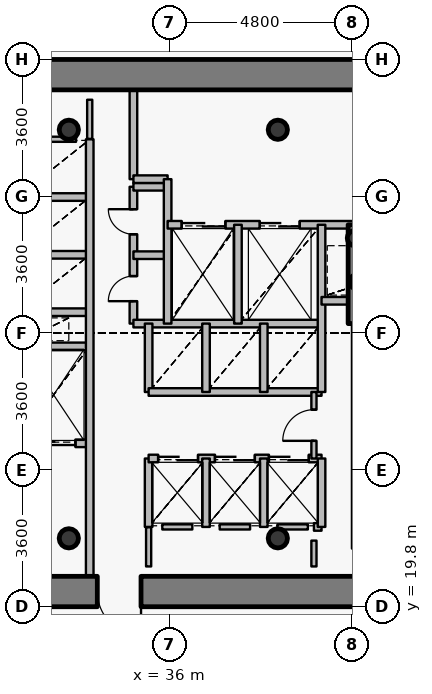
"""IFC4 building model, lengths in metres.
Left out: names, types, materials, properties, quantities, classifications, styles, units other than length and angle.
Written with IfcOpenShell. Run it as: python <this file> out.ifc"""

import sys

from ifc_helpers import new_model, si_unit, direction, frame, frame_2d, origin, origin_2d, place, context, subcontext, project, spatial, rectangle, hollow_circle, extrude, source, transform, mapped, element, fill, save


model = new_model("IFC4")
c1 = context("Model", 3, precision=1e-05, world=origin(), true_north=direction((0.0, 1.0)))
c2 = subcontext(c1, "Body", "Model", "MODEL_VIEW")
j1 = project(units=[si_unit("LENGTHUNIT", "METRE"), si_unit("PLANEANGLEUNIT", "RADIAN")], contexts=[c1])
p1 = place(None, origin())
s1 = spatial("IfcSite", under=j1, at=p1, CompositionType="ELEMENT")
p2 = place(p1, origin())
s2 = spatial("IfcBuilding", under=s1, at=p2, CompositionType="ELEMENT")
p3 = place(p2, frame((0.0, 0.0, 92.4)))
s3 = spatial("IfcBuildingStorey", under=s2, at=p3, CompositionType="ELEMENT", Elevation=92.4)
for number, where, z_axis, x_axis in (
    (1, (33.35, 21.6, 0.0), (0.0, 0.0, 1.0), (1.0, 0.0, 0.0)),
    (2, (38.85, 21.6, 0.0), (0.0, 0.0, 1.0), (1.0, 0.0, 0.0)),
    (3, (38.85, 32.35, 0.0), (0.0, 0.0, 1.0), (1.0, 0.0, 0.0)),
    (4, (33.35, 32.35, 0.0), (0.0, 0.0, 1.0), (1.0, 0.0, 0.0)),
):
    element("IfcColumn", number, at=place(p3, frame(where, z_axis=z_axis, x_axis=x_axis)), inside=s3, PredefinedType="COLUMN", context=c2, shape_type="SweptSolid", body=[
        extrude(hollow_circle(Radius=0.254, WallThickness=0.02, at=origin_2d()), origin(), (0.0, 0.0, 1.0), 4.8),
    ])
for number, where, z_axis, x_axis in (
    (5, (40.95, 28.35, 0.0), (0.0, 0.0, 1.0), (1.0, 0.0, 0.0)),
    (6, (40.88, 29.5, 0.0), (0.0, 0.0, 1.0), (1.0, 0.0, 0.0)),
):
    element("IfcColumn", number, at=place(p3, frame(where, z_axis=z_axis, x_axis=x_axis)), inside=s3, PredefinedType="COLUMN", context=c2, shape_type="SweptSolid", body=[
        extrude(hollow_circle(Radius=0.203, WallThickness=0.016, at=origin_2d()), origin(), (0.0, 0.0, 1.0), 4.8),
    ])
p4 = place(p3, frame((26.6, 33.8, 0.0), z_axis=(0.0, 0.0, 1.0), x_axis=(1.0, 0.0, 0.0)))
e7 = element("IfcWall", 7, at=p4, inside=s3, PredefinedType="SHEAR", context=c2, shape_type="SweptSolid", body=[
    extrude(rectangle(XDim=18.8, YDim=0.8, at=frame_2d((9.4, 0.0))), origin(), (0.0, 0.0, 1.0), 4.0),
])
p5 = place(p3, frame((45.4, 20.2, 0.0), z_axis=(0.0, 0.0, 1.0), x_axis=(-1.0, 0.0, 0.0)))
e8 = element("IfcWall", 8, at=p5, inside=s3, PredefinedType="SHEAR", context=c2, shape_type="SweptSolid", body=[
    extrude(rectangle(XDim=18.8, YDim=0.8, at=frame_2d((9.4, 0.0))), origin(), (0.0, 0.0, 1.0), 4.0),
])
p6 = place(p5, frame((10.15, 0.0, 0.0)))
e9 = element("IfcOpeningElement", 9, at=p6, cuts=e8, PredefinedType="OPENING", context=c2, shape_type="SweptSolid", body=[
    extrude(rectangle(XDim=1.15, YDim=2.15, at=origin_2d()), frame((0.575, 0.41, 1.075), z_axis=(0.0, -1.0, 0.0), x_axis=(1.0, 0.0, 0.0)), (0.0, 0.0, 1.0), 0.82),
])
p7 = place(p3, frame((40.9, 27.25, 0.0), z_axis=(0.0, 0.0, 1.0), x_axis=(0.0, 1.0, 0.0)))
e10 = element("IfcWall", 10, at=p7, inside=s3, PredefinedType="SHEAR", context=c2, shape_type="SweptSolid", body=[
    extrude(rectangle(XDim=2.6, YDim=0.4, at=frame_2d((1.3, 0.0))), origin(), (0.0, 0.0, 1.0), 4.15),
])
p8 = place(p3, frame((32.0, 24.1, 0.0), z_axis=(0.0, 0.0, 1.0), x_axis=(1.0, 0.0, 0.0)))
e11 = element("IfcWall", 11, at=p8, inside=s3, PredefinedType="PARTITIONING", context=c2, shape_type="SweptSolid", body=[
    extrude(rectangle(XDim=1.9, YDim=0.2, at=frame_2d((0.95, 0.0))), origin(), (0.0, 0.0, 1.0), 4.135),
])
p9 = place(p8, frame((0.375, 0.0, 0.0)))
e12 = element("IfcOpeningElement", 12, at=p9, cuts=e11, PredefinedType="OPENING", context=c2, shape_type="SweptSolid", body=[
    extrude(rectangle(XDim=1.15, YDim=2.15, at=origin_2d()), frame((0.575, 0.11, 1.075), z_axis=(0.0, -1.0, 0.0), x_axis=(1.0, 0.0, 0.0)), (0.0, 0.0, 1.0), 0.22),
])
for number, where, z_axis, x_axis in (
    (13, (32.0, 26.65, 0.0), (0.0, 0.0, 1.0), (1.0, 0.0, 0.0)),
    (14, (32.0, 27.55, 0.0), (0.0, 0.0, 1.0), (1.0, 0.0, 0.0)),
    (15, (32.0, 29.06, 0.0), (0.0, 0.0, 1.0), (1.0, 0.0, 0.0)),
    (16, (32.0, 30.58, 0.0), (0.0, 0.0, 1.0), (1.0, 0.0, 0.0)),
):
    element("IfcWall", number, at=place(p3, frame(where, z_axis=z_axis, x_axis=x_axis)), inside=s3, PredefinedType="PARTITIONING", context=c2, shape_type="SweptSolid", body=[
        extrude(rectangle(XDim=1.9, YDim=0.2, at=frame_2d((0.95, 0.0))), origin(), (0.0, 0.0, 1.0), 4.135),
    ])
p10 = place(p3, frame((33.9, 20.6, 0.0), z_axis=(0.0, 0.0, 1.0), x_axis=(0.0, 1.0, 0.0)))
e17 = element("IfcWall", 17, at=p10, inside=s3, PredefinedType="PARTITIONING", context=c2, shape_type="SweptSolid", body=[
    extrude(rectangle(XDim=11.5, YDim=0.2, at=frame_2d((5.75, 0.0))), origin(), (0.0, 0.0, 1.0), 4.135),
])
p11 = place(p3, frame((35.05, 27.25, 0.0), z_axis=(0.0, 0.0, 1.0), x_axis=(0.0, 1.0, 0.0)))
e18 = element("IfcWall", 18, at=p11, inside=s3, PredefinedType="PARTITIONING", context=c2, shape_type="SweptSolid", body=[
    extrude(rectangle(XDim=3.6, YDim=0.2, at=frame_2d((1.8, 0.0))), origin(), (0.0, 0.0, 1.0), 4.55),
])
p12 = place(p11, frame((0.59, 0.0, 0.0)))
e19 = element("IfcOpeningElement", 19, at=p12, cuts=e18, PredefinedType="OPENING", context=c2, shape_type="SweptSolid", body=[
    extrude(rectangle(XDim=0.66, YDim=2.05, at=origin_2d()), frame((0.33, 0.11, 1.025), z_axis=(0.0, -1.0, 0.0), x_axis=(1.0, 0.0, 0.0)), (0.0, 0.0, 1.0), 0.22),
])
p13 = place(p11, frame((2.35, 0.0, 0.0)))
e20 = element("IfcOpeningElement", 20, at=p13, cuts=e18, PredefinedType="OPENING", context=c2, shape_type="SweptSolid", body=[
    extrude(rectangle(XDim=0.66, YDim=2.05, at=origin_2d()), frame((0.33, 0.11, 1.025), z_axis=(0.0, -1.0, 0.0), x_axis=(1.0, 0.0, 0.0)), (0.0, 0.0, 1.0), 0.22),
])
p14 = place(p3, frame((35.05, 27.25, 0.0), z_axis=(0.0, 0.0, 1.0), x_axis=(1.0, 0.0, 0.0)))
e21 = element("IfcWall", 21, at=p14, inside=s3, PredefinedType="PARTITIONING", context=c2, shape_type="SweptSolid", body=[
    extrude(rectangle(XDim=4.95, YDim=0.2, at=frame_2d((2.475, 0.0))), origin(), (0.0, 0.0, 1.0), 4.135),
])
for number, where, z_axis, x_axis in (
    (22, (35.05, 29.05, 0.0), (0.0, 0.0, 1.0), (1.0, 0.0, 0.0)),
    (23, (35.05, 30.85, 0.0), (0.0, 0.0, 1.0), (1.0, 0.0, 0.0)),
):
    element("IfcWall", number, at=place(p3, frame(where, z_axis=z_axis, x_axis=x_axis)), inside=s3, PredefinedType="PARTITIONING", context=c2, shape_type="SweptSolid", body=[
        extrude(rectangle(XDim=0.9, YDim=0.2, at=frame_2d((0.45, 0.0))), origin(), (0.0, 0.0, 1.0), 4.55),
    ])
p15 = place(p3, frame((35.05, 31.05, 0.0), z_axis=(0.0, 0.0, 1.0), x_axis=(0.0, 1.0, 0.0)))
e24 = element("IfcWall", 24, at=p15, inside=s3, PredefinedType="PARTITIONING", context=c2, shape_type="SweptSolid", body=[
    extrude(rectangle(XDim=2.35, YDim=0.2, at=frame_2d((1.175, 0.0))), origin(), (0.0, 0.0, 1.0), 4.135),
])
p16 = place(p3, frame((35.05, 31.05, 0.0), z_axis=(0.0, 0.0, 1.0), x_axis=(1.0, 0.0, 0.0)))
e25 = element("IfcWall", 25, at=p16, inside=s3, PredefinedType="PARTITIONING", context=c2, shape_type="SweptSolid", body=[
    extrude(rectangle(XDim=0.9, YDim=0.2, at=frame_2d((0.45, 0.0))), origin(), (0.0, 0.0, 1.0), 4.55),
])
p17 = place(p3, frame((35.45, 21.9, 0.0), z_axis=(0.0, 0.0, 1.0), x_axis=(0.0, 1.0, 0.0)))
e26 = element("IfcWall", 26, at=p17, inside=s3, PredefinedType="PARTITIONING", context=c2, shape_type="SweptSolid", body=[
    extrude(rectangle(XDim=1.8, YDim=0.2, at=frame_2d((0.9, 0.0))), origin(), (0.0, 0.0, 1.0), 4.55),
])
p18 = place(p3, frame((35.45, 23.7, 0.0), z_axis=(0.0, 0.0, 1.0), x_axis=(1.0, 0.0, 0.0)))
e27 = element("IfcWall", 27, at=p18, inside=s3, PredefinedType="PARTITIONING", context=c2, shape_type="SweptSolid", body=[
    extrude(rectangle(XDim=4.55, YDim=0.2, at=frame_2d((2.275, 0.0))), origin(), (0.0, 0.0, 1.0), 4.135),
])
p19 = place(p18, frame((0.25, 0.0, 0.0)))
e28 = element("IfcOpeningElement", 28, at=p19, cuts=e27, PredefinedType="OPENING", context=c2, shape_type="SweptSolid", body=[
    extrude(rectangle(XDim=1.05, YDim=2.15, at=origin_2d()), frame((0.525, 0.11, 1.075), z_axis=(0.0, -1.0, 0.0), x_axis=(1.0, 0.0, 0.0)), (0.0, 0.0, 1.0), 0.22),
])
p20 = place(p18, frame((1.745, 0.0, 0.0)))
e29 = element("IfcOpeningElement", 29, at=p20, cuts=e27, PredefinedType="OPENING", context=c2, shape_type="SweptSolid", body=[
    extrude(rectangle(XDim=1.05, YDim=2.15, at=origin_2d()), frame((0.525, 0.11, 1.075), z_axis=(0.0, -1.0, 0.0), x_axis=(1.0, 0.0, 0.0)), (0.0, 0.0, 1.0), 0.22),
])
p21 = place(p18, frame((3.165, 0.0, 0.0)))
e30 = element("IfcOpeningElement", 30, at=p21, cuts=e27, PredefinedType="OPENING", context=c2, shape_type="SweptSolid", body=[
    extrude(rectangle(XDim=1.05, YDim=2.15, at=origin_2d()), frame((0.525, 0.11, 1.075), z_axis=(0.0, -1.0, 0.0), x_axis=(1.0, 0.0, 0.0)), (0.0, 0.0, 1.0), 0.22),
])
p22 = place(p3, frame((35.45, 25.45, 0.0), z_axis=(0.0, 0.0, 1.0), x_axis=(0.0, 1.0, 0.0)))
e31 = element("IfcWall", 31, at=p22, inside=s3, PredefinedType="PARTITIONING", context=c2, shape_type="SweptSolid", body=[
    extrude(rectangle(XDim=1.8, YDim=0.2, at=frame_2d((0.9, 0.0))), origin(), (0.0, 0.0, 1.0), 4.55),
])
p23 = place(p3, frame((35.45, 25.45, 0.0), z_axis=(0.0, 0.0, 1.0), x_axis=(1.0, 0.0, 0.0)))
e32 = element("IfcWall", 32, at=p23, inside=s3, PredefinedType="PARTITIONING", context=c2, shape_type="SweptSolid", body=[
    extrude(rectangle(XDim=4.55, YDim=0.2, at=frame_2d((2.275, 0.0))), origin(), (0.0, 0.0, 1.0), 4.135),
])
p24 = place(p3, frame((35.95, 27.25, 0.0), z_axis=(0.0, 0.0, 1.0), x_axis=(0.0, 1.0, 0.0)))
e33 = element("IfcWall", 33, at=p24, inside=s3, PredefinedType="PARTITIONING", context=c2, shape_type="SweptSolid", body=[
    extrude(rectangle(XDim=3.8, YDim=0.2, at=frame_2d((1.9, 0.0))), origin(), (0.0, 0.0, 1.0), 4.55),
])
p25 = place(p3, frame((35.95, 29.85, 0.0), z_axis=(0.0, 0.0, 1.0), x_axis=(1.0, 0.0, 0.0)))
e34 = element("IfcWall", 34, at=p25, inside=s3, PredefinedType="PARTITIONING", context=c2, shape_type="SweptSolid", body=[
    extrude(rectangle(XDim=8.49, YDim=0.2, at=frame_2d((4.245, 0.0))), origin(), (0.0, 0.0, 1.0), 4.135),
])
p26 = place(p25, frame((6.1, 0.0, 0.0)))
e35 = element("IfcOpeningElement", 35, at=p26, cuts=e34, PredefinedType="OPENING", context=c2, shape_type="SweptSolid", body=[
    extrude(rectangle(XDim=1.2, YDim=2.15, at=origin_2d()), frame((0.6, 0.11, 1.075), z_axis=(0.0, -1.0, 0.0), x_axis=(1.0, 0.0, 0.0)), (0.0, 0.0, 1.0), 0.22),
])
p27 = place(p25, frame((0.37, 0.0, 0.0)))
e36 = element("IfcOpeningElement", 36, at=p27, cuts=e34, PredefinedType="OPENING", context=c2, shape_type="SweptSolid", body=[
    extrude(rectangle(XDim=1.15, YDim=2.15, at=origin_2d()), frame((0.575, 0.11, 1.075), z_axis=(0.0, -1.0, 0.0), x_axis=(1.0, 0.0, 0.0)), (0.0, 0.0, 1.0), 0.22),
])
p28 = place(p25, frame((2.425, 0.0, 0.0)))
e37 = element("IfcOpeningElement", 37, at=p28, cuts=e34, PredefinedType="OPENING", context=c2, shape_type="SweptSolid", body=[
    extrude(rectangle(XDim=1.05, YDim=2.15, at=origin_2d()), frame((0.525, 0.11, 1.075), z_axis=(0.0, -1.0, 0.0), x_axis=(1.0, 0.0, 0.0)), (0.0, 0.0, 1.0), 0.22),
])
for number, where, z_axis, x_axis in (
    (38, (36.96, 21.9, 0.0), (0.0, 0.0, 1.0), (0.0, 1.0, 0.0)),
    (39, (36.96, 25.45, 0.0), (0.0, 0.0, 1.0), (0.0, 1.0, 0.0)),
):
    element("IfcWall", number, at=place(p3, frame(where, z_axis=z_axis, x_axis=x_axis)), inside=s3, PredefinedType="PARTITIONING", context=c2, shape_type="SweptSolid", body=[
        extrude(rectangle(XDim=1.8, YDim=0.2, at=frame_2d((0.9, 0.0))), origin(), (0.0, 0.0, 1.0), 4.55),
    ])
p29 = place(p3, frame((37.8, 27.25, 0.0), z_axis=(0.0, 0.0, 1.0), x_axis=(0.0, 1.0, 0.0)))
e40 = element("IfcWall", 40, at=p29, inside=s3, PredefinedType="PARTITIONING", context=c2, shape_type="SweptSolid", body=[
    extrude(rectangle(XDim=2.6, YDim=0.2, at=frame_2d((1.3, 0.0))), origin(), (0.0, 0.0, 1.0), 4.55),
])
for number, where, z_axis, x_axis in (
    (41, (38.48, 21.9, 0.0), (0.0, 0.0, 1.0), (0.0, 1.0, 0.0)),
    (42, (38.48, 25.45, 0.0), (0.0, 0.0, 1.0), (0.0, 1.0, 0.0)),
):
    element("IfcWall", number, at=place(p3, frame(where, z_axis=z_axis, x_axis=x_axis)), inside=s3, PredefinedType="PARTITIONING", context=c2, shape_type="SweptSolid", body=[
        extrude(rectangle(XDim=1.8, YDim=0.2, at=frame_2d((0.9, 0.0))), origin(), (0.0, 0.0, 1.0), 4.55),
    ])
p30 = place(p3, frame((39.8, 21.9, 0.0), z_axis=(0.0, 0.0, 1.0), x_axis=(1.0, 0.0, 0.0)))
e43 = element("IfcWall", 43, at=p30, inside=s3, PredefinedType="PARTITIONING", context=c2, shape_type="SweptSolid", body=[
    extrude(rectangle(XDim=0.2, YDim=0.2, at=frame_2d((0.1, 0.0))), origin(), (0.0, 0.0, 1.0), 4.55),
])
p31 = place(p3, frame((39.8, 23.7, 0.0), z_axis=(0.0, 0.0, 1.0), x_axis=(0.0, 1.0, 0.0)))
e44 = element("IfcWall", 44, at=p31, inside=s3, PredefinedType="PARTITIONING", context=c2, shape_type="SweptSolid", body=[
    extrude(rectangle(XDim=1.75, YDim=0.135, at=frame_2d((0.875, 0.0))), origin(), (0.0, 0.0, 1.0), 4.55),
])
p32 = place(p31, frame((0.465, 0.0, 0.0)))
e45 = element("IfcOpeningElement", 45, at=p32, cuts=e44, PredefinedType="OPENING", context=c2, shape_type="SweptSolid", body=[
    extrude(rectangle(XDim=0.82, YDim=2.1, at=origin_2d()), frame((0.41, 0.078, 1.05), z_axis=(0.0, -1.0, 0.0), x_axis=(1.0, 0.0, 0.0)), (0.0, 0.0, 1.0), 0.155),
])
p33 = place(p3, frame((40.0, 21.9, 0.0), z_axis=(0.0, 0.0, 1.0), x_axis=(0.0, 1.0, 0.0)))
e46 = element("IfcWall", 46, at=p33, inside=s3, PredefinedType="PARTITIONING", context=c2, shape_type="SweptSolid", body=[
    extrude(rectangle(XDim=1.8, YDim=0.2, at=frame_2d((0.9, 0.0))), origin(), (0.0, 0.0, 1.0), 4.55),
])
p34 = place(p3, frame((40.0, 25.45, 0.0), z_axis=(0.0, 0.0, 1.0), x_axis=(0.0, 1.0, 0.0)))
e47 = element("IfcWall", 47, at=p34, inside=s3, PredefinedType="PARTITIONING", context=c2, shape_type="SweptSolid", body=[
    extrude(rectangle(XDim=4.4, YDim=0.2, at=frame_2d((2.2, 0.0))), origin(), (0.0, 0.0, 1.0), 4.55),
])
p35 = place(p3, frame((40.0, 27.85, 0.0), z_axis=(0.0, 0.0, 1.0), x_axis=(1.0, 0.0, 0.0)))
e48 = element("IfcWall", 48, at=p35, inside=s3, PredefinedType="PARTITIONING", context=c2, shape_type="SweptSolid", body=[
    extrude(rectangle(XDim=0.9, YDim=0.2, at=frame_2d((0.45, 0.0))), origin(), (0.0, 0.0, 1.0), 4.55),
])
p36 = place(p3, frame((40.9, 21.33, 0.0), z_axis=(0.0, 0.0, 1.0), x_axis=(0.0, 1.0, 0.0)))
e49 = element("IfcWall", 49, at=p36, inside=s3, PredefinedType="PARTITIONING", context=c2, shape_type="SweptSolid", body=[
    extrude(rectangle(XDim=5.91, YDim=0.2, at=frame_2d((2.955, 0.0))), origin(), (0.0, 0.0, 1.0), 4.085),
])
p37 = place(p3, frame((36.6, 21.9, 0.0), z_axis=(0.0, 0.0, 1.0), x_axis=(-1.0, 0.0, 0.0)))
e50 = element("IfcWall", 50, at=p37, inside=s3, PredefinedType="PARTITIONING", context=c2, shape_type="SweptSolid", body=[
    extrude(rectangle(XDim=0.79, YDim=0.135, at=frame_2d((0.395, 0.0))), origin(), (0.0, 0.0, 1.0), 4.55),
])
p38 = place(p3, frame((38.12, 21.9, 0.0), z_axis=(0.0, 0.0, 1.0), x_axis=(-1.0, 0.0, 0.0)))
e51 = element("IfcWall", 51, at=p38, inside=s3, PredefinedType="PARTITIONING", context=c2, shape_type="SweptSolid", body=[
    extrude(rectangle(XDim=0.8, YDim=0.135, at=frame_2d((0.4, 0.0))), origin(), (0.0, 0.0, 1.0), 4.55),
])
p39 = place(p3, frame((39.64, 21.9, 0.0), z_axis=(0.0, 0.0, 1.0), x_axis=(-1.0, 0.0, 0.0)))
e52 = element("IfcWall", 52, at=p39, inside=s3, PredefinedType="PARTITIONING", context=c2, shape_type="SweptSolid", body=[
    extrude(rectangle(XDim=0.8, YDim=0.135, at=frame_2d((0.4, 0.0))), origin(), (0.0, 0.0, 1.0), 4.135),
])
p40 = place(p3, frame((32.36, 32.1, 0.0), z_axis=(0.0, 0.0, 1.0), x_axis=(1.0, 0.0, 0.0)))
e53 = element("IfcWall", 53, at=p40, inside=s3, PredefinedType="PARTITIONING", context=c2, shape_type="SweptSolid", body=[
    extrude(rectangle(XDim=1.18, YDim=0.135, at=frame_2d((0.59, 0.0))), origin(), (0.0, 0.0, 1.0), 4.135),
])
p41 = place(p3, frame((39.8, 20.86, 0.0), z_axis=(0.0, 0.0, 1.0), x_axis=(0.0, 1.0, 0.0)))
e54 = element("IfcWall", 54, at=p41, inside=s3, PredefinedType="PARTITIONING", context=c2, shape_type="SweptSolid", body=[
    extrude(rectangle(XDim=0.68, YDim=0.135, at=frame_2d((0.34, 0.0))), origin(), (0.0, 0.0, 1.0), 4.085),
])
for number, where, z_axis, x_axis in (
    (55, (35.45, 21.89, 0.0), (0.0, 0.0, 1.0), (0.0, -1.0, 0.0)),
    (56, (33.9, 32.11, 0.0), (0.0, 0.0, 1.0), (0.0, 1.0, 0.0)),
):
    element("IfcWall", number, at=place(p3, frame(where, z_axis=z_axis, x_axis=x_axis)), inside=s3, PredefinedType="PARTITIONING", context=c2, shape_type="SweptSolid", body=[
        extrude(rectangle(XDim=1.03, YDim=0.135, at=frame_2d((0.515, 0.0))), origin(), (0.0, 0.0, 1.0), 4.135),
    ])
m1 = source(origin(), c2, "Body", "SweptSolid", [
    extrude(rectangle(XDim=1.15, YDim=2.15, at=origin_2d()), frame((0.575, 0.025, 1.075), z_axis=(0.0, -1.0, 0.0), x_axis=(1.0, 0.0, 0.0)), (0.0, 0.0, 1.0), 0.05),
])
p42 = place(p6, origin())
e57 = element("IfcDoor", 57, at=p42, inside=s3, OperationType="SINGLE_SWING_LEFT", PredefinedType="DOOR", context=c2, shape_type="MappedRepresentation", body=[
    mapped(m1, transform((0.0, 0.0, 0.0), x_axis=(1.0, 0.0, 0.0), y_axis=(0.0, 1.0, 0.0), z_axis=(0.0, 0.0, 1.0), scale=1.0)),
])
fill(e9, e57)
m2 = source(origin(), c2, "Body", "SweptSolid", [
    extrude(rectangle(XDim=1.15, YDim=2.15, at=origin_2d()), frame((0.575, 0.025, 1.075), z_axis=(0.0, -1.0, 0.0), x_axis=(1.0, 0.0, 0.0)), (0.0, 0.0, 1.0), 0.05),
])
p43 = place(p27, origin())
e58 = element("IfcDoor", 58, at=p43, inside=s3, OperationType="DOUBLE_DOOR_SLIDING", PredefinedType="USERDEFINED", context=c2, shape_type="MappedRepresentation", body=[
    mapped(m2, transform((0.0, 0.0, 0.0), x_axis=(1.0, 0.0, 0.0), y_axis=(0.0, 1.0, 0.0), z_axis=(0.0, 0.0, 1.0), scale=1.0)),
])
fill(e36, e58)
p44 = place(p9, origin())
e59 = element("IfcDoor", 59, at=p44, inside=s3, OperationType="DOUBLE_DOOR_SLIDING", PredefinedType="USERDEFINED", context=c2, shape_type="MappedRepresentation", body=[
    mapped(m2, transform((0.0, 0.0, 0.0), x_axis=(1.0, 0.0, 0.0), y_axis=(0.0, 1.0, 0.0), z_axis=(0.0, 0.0, 1.0), scale=1.0)),
])
fill(e12, e59)
m3 = source(origin(), c2, "Body", "SweptSolid", [
    extrude(rectangle(XDim=1.05, YDim=2.15, at=origin_2d()), frame((0.525, 0.025, 1.075), z_axis=(0.0, -1.0, 0.0), x_axis=(1.0, 0.0, 0.0)), (0.0, 0.0, 1.0), 0.05),
])
p45 = place(p28, origin())
e60 = element("IfcDoor", 60, at=p45, inside=s3, OperationType="DOUBLE_DOOR_SLIDING", PredefinedType="USERDEFINED", context=c2, shape_type="MappedRepresentation", body=[
    mapped(m3, transform((0.0, 0.0, 0.0), x_axis=(1.0, 0.0, 0.0), y_axis=(0.0, 1.0, 0.0), z_axis=(0.0, 0.0, 1.0), scale=1.0)),
])
fill(e37, e60)
p46 = place(p19, origin())
e61 = element("IfcDoor", 61, at=p46, inside=s3, OperationType="DOUBLE_DOOR_SLIDING", PredefinedType="USERDEFINED", context=c2, shape_type="MappedRepresentation", body=[
    mapped(m3, transform((0.0, 0.0, 0.0), x_axis=(1.0, 0.0, 0.0), y_axis=(0.0, 1.0, 0.0), z_axis=(0.0, 0.0, 1.0), scale=1.0)),
])
fill(e28, e61)
p47 = place(p20, origin())
e62 = element("IfcDoor", 62, at=p47, inside=s3, OperationType="DOUBLE_DOOR_SLIDING", PredefinedType="USERDEFINED", context=c2, shape_type="MappedRepresentation", body=[
    mapped(m3, transform((0.0, 0.0, 0.0), x_axis=(1.0, 0.0, 0.0), y_axis=(0.0, 1.0, 0.0), z_axis=(0.0, 0.0, 1.0), scale=1.0)),
])
fill(e29, e62)
p48 = place(p21, origin())
e63 = element("IfcDoor", 63, at=p48, inside=s3, OperationType="DOUBLE_DOOR_SLIDING", PredefinedType="USERDEFINED", context=c2, shape_type="MappedRepresentation", body=[
    mapped(m3, transform((0.0, 0.0, 0.0), x_axis=(1.0, 0.0, 0.0), y_axis=(0.0, 1.0, 0.0), z_axis=(0.0, 0.0, 1.0), scale=1.0)),
])
fill(e30, e63)
m4 = source(origin(), c2, "Body", "SweptSolid", [
    extrude(rectangle(XDim=0.66, YDim=2.05, at=origin_2d()), frame((0.33, 0.025, 1.025), z_axis=(0.0, -1.0, 0.0), x_axis=(1.0, 0.0, 0.0)), (0.0, 0.0, 1.0), 0.05),
])
p49 = place(p12, origin())
e64 = element("IfcDoor", 64, at=p49, inside=s3, OperationType="SINGLE_SWING_LEFT", PredefinedType="USERDEFINED", context=c2, shape_type="MappedRepresentation", body=[
    mapped(m4, transform((0.0, 0.0, 0.0), x_axis=(1.0, 0.0, 0.0), y_axis=(0.0, 1.0, 0.0), z_axis=(0.0, 0.0, 1.0), scale=1.0)),
])
fill(e19, e64)
p50 = place(p13, origin())
e65 = element("IfcDoor", 65, at=p50, inside=s3, OperationType="SINGLE_SWING_RIGHT", PredefinedType="USERDEFINED", context=c2, shape_type="MappedRepresentation", body=[
    mapped(m4, transform((0.0, 0.0, 0.0), x_axis=(1.0, 0.0, 0.0), y_axis=(0.0, 1.0, 0.0), z_axis=(0.0, 0.0, 1.0), scale=1.0)),
])
fill(e20, e65)
m5 = source(origin(), c2, "Body", "SweptSolid", [
    extrude(rectangle(XDim=0.82, YDim=2.1, at=origin_2d()), frame((0.41, 0.025, 1.05), z_axis=(0.0, -1.0, 0.0), x_axis=(1.0, 0.0, 0.0)), (0.0, 0.0, 1.0), 0.05),
])
p51 = place(p32, origin())
e66 = element("IfcDoor", 66, at=p51, inside=s3, OperationType="SINGLE_SWING_LEFT", PredefinedType="DOOR", context=c2, shape_type="MappedRepresentation", body=[
    mapped(m5, transform((0.0, 0.0, 0.0), x_axis=(1.0, 0.0, 0.0), y_axis=(0.0, 1.0, 0.0), z_axis=(0.0, 0.0, 1.0), scale=1.0)),
])
fill(e45, e66)
save(model, sys.argv[1])
